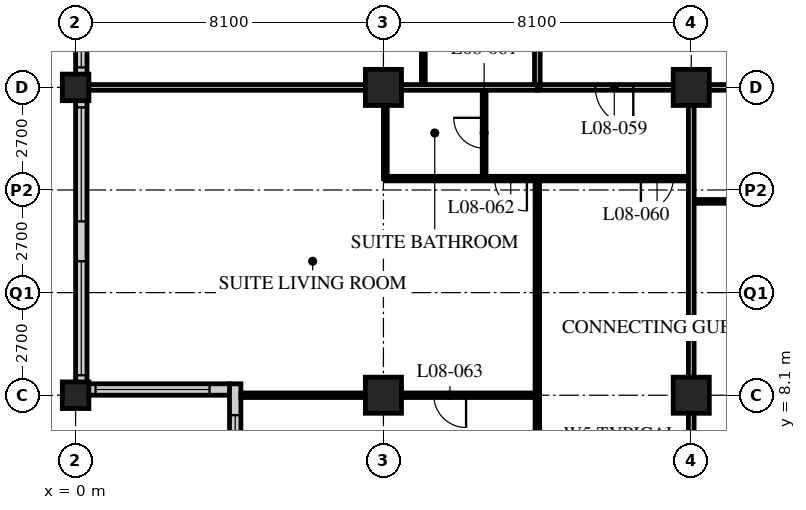
"""IFC4 building model, lengths in metres.
Left out: names, types, materials, properties, quantities, classifications, styles, units other than length and angle.
Written with IfcOpenShell. Run it as: python <this file> out.ifc"""

import sys

from ifc_helpers import new_model, si_unit, direction, frame, frame_2d, origin, origin_2d, place, context, subcontext, project, spatial, rectangle, hollow_rectangle, extrude, element, fill, save


model = new_model("IFC4")
c1 = context("Model", 3, precision=1e-05, world=origin(), true_north=direction((0.0, 1.0)))
c2 = subcontext(c1, "Body", "Model", "MODEL_VIEW")
j1 = project(units=[si_unit("LENGTHUNIT", "METRE"), si_unit("PLANEANGLEUNIT", "RADIAN")], contexts=[c1])
p1 = place(None, origin())
s1 = spatial("IfcSite", under=j1, at=p1, CompositionType="ELEMENT")
p2 = place(p1, origin())
s2 = spatial("IfcBuilding", under=s1, at=p2, CompositionType="ELEMENT")
p3 = place(p2, frame((0.0, 0.0, 39.8)))
s3 = spatial("IfcBuildingStorey", under=s2, at=p3, CompositionType="ELEMENT", Elevation=39.8)
for number, where, z_axis, x_axis in (
    (1, (0.0, 8.1, 0.0), (0.0, 0.0, 1.0), (1.0, 0.0, 0.0)),
    (2, (0.0, 16.2, 0.0), (0.0, 0.0, 1.0), (1.0, 0.0, 0.0)),
):
    element("IfcColumn", number, at=place(p3, frame(where, z_axis=z_axis, x_axis=x_axis)), inside=s3, PredefinedType="COLUMN", context=c2, shape_type="SweptSolid", body=[
        extrude(hollow_rectangle(XDim=0.7, YDim=0.7, WallThickness=0.06, at=origin_2d()), origin(), (0.0, 0.0, 1.0), 3.4),
    ])
for number, where, z_axis, x_axis in (
    (3, (8.1, 8.1, 0.0), (0.0, 0.0, 1.0), (1.0, 0.0, 0.0)),
    (4, (8.1, 16.2, 0.0), (0.0, 0.0, 1.0), (1.0, 0.0, 0.0)),
    (5, (16.2, 8.1, 0.0), (0.0, 0.0, 1.0), (1.0, 0.0, 0.0)),
    (6, (16.2, 16.2, 0.0), (0.0, 0.0, 1.0), (1.0, 0.0, 0.0)),
):
    element("IfcColumn", number, at=place(p3, frame(where, z_axis=z_axis, x_axis=x_axis)), inside=s3, PredefinedType="COLUMN", context=c2, shape_type="SweptSolid", body=[
        extrude(hollow_rectangle(XDim=0.95, YDim=0.95, WallThickness=0.095, at=origin_2d()), origin(), (0.0, 0.0, 1.0), 3.4),
    ])
p4 = place(p3, frame((0.15, 40.2, 0.0), z_axis=(0.0, 0.0, 1.0), x_axis=(0.0, -1.0, 0.0)))
e7 = element("IfcWall", 7, at=p4, inside=s3, PredefinedType="SOLIDWALL", context=c2, shape_type="SweptSolid", body=[
    extrude(rectangle(XDim=32.1, YDim=0.3, at=frame_2d((16.05, 0.0))), origin(), (0.0, 0.0, 1.0), 3.19),
])
p5 = place(p4, frame((0.225, 0.0, 0.9)))
e8 = element("IfcOpeningElement", 8, at=p5, cuts=e7, PredefinedType="OPENING", context=c2, shape_type="SweptSolid", body=[
    extrude(rectangle(XDim=3.0, YDim=2.0, at=frame_2d((1.5, 1.0))), frame((0.0, 0.16, 0.0), z_axis=(0.0, -1.0, 0.0), x_axis=(1.0, 0.0, 0.0)), (0.0, 0.0, 1.0), 0.32),
])
p6 = place(p4, frame((4.275, 0.0, 0.9)))
e9 = element("IfcOpeningElement", 9, at=p6, cuts=e7, PredefinedType="OPENING", context=c2, shape_type="SweptSolid", body=[
    extrude(rectangle(XDim=3.0, YDim=2.0, at=frame_2d((1.5, 1.0))), frame((0.0, 0.16, 0.0), z_axis=(0.0, -1.0, 0.0), x_axis=(1.0, 0.0, 0.0)), (0.0, 0.0, 1.0), 0.32),
])
p7 = place(p4, frame((8.325, 0.0, 0.9)))
e10 = element("IfcOpeningElement", 10, at=p7, cuts=e7, PredefinedType="OPENING", context=c2, shape_type="SweptSolid", body=[
    extrude(rectangle(XDim=3.0, YDim=2.0, at=frame_2d((1.5, 1.0))), frame((0.0, 0.16, 0.0), z_axis=(0.0, -1.0, 0.0), x_axis=(1.0, 0.0, 0.0)), (0.0, 0.0, 1.0), 0.32),
])
p8 = place(p4, frame((12.375, 0.0, 0.9)))
e11 = element("IfcOpeningElement", 11, at=p8, cuts=e7, PredefinedType="OPENING", context=c2, shape_type="SweptSolid", body=[
    extrude(rectangle(XDim=3.0, YDim=2.0, at=frame_2d((1.5, 1.0))), frame((0.0, 0.16, 0.0), z_axis=(0.0, -1.0, 0.0), x_axis=(1.0, 0.0, 0.0)), (0.0, 0.0, 1.0), 0.32),
])
p9 = place(p4, frame((16.425, 0.0, 0.9)))
e12 = element("IfcOpeningElement", 12, at=p9, cuts=e7, PredefinedType="OPENING", context=c2, shape_type="SweptSolid", body=[
    extrude(rectangle(XDim=3.0, YDim=2.0, at=frame_2d((1.5, 1.0))), frame((0.0, 0.16, 0.0), z_axis=(0.0, -1.0, 0.0), x_axis=(1.0, 0.0, 0.0)), (0.0, 0.0, 1.0), 0.32),
])
p10 = place(p4, frame((20.475, 0.0, 0.9)))
e13 = element("IfcOpeningElement", 13, at=p10, cuts=e7, PredefinedType="OPENING", context=c2, shape_type="SweptSolid", body=[
    extrude(rectangle(XDim=3.0, YDim=2.0, at=frame_2d((1.5, 1.0))), frame((0.0, 0.16, 0.0), z_axis=(0.0, -1.0, 0.0), x_axis=(1.0, 0.0, 0.0)), (0.0, 0.0, 1.0), 0.32),
])
p11 = place(p4, frame((24.525, 0.0, 0.9)))
e14 = element("IfcOpeningElement", 14, at=p11, cuts=e7, PredefinedType="OPENING", context=c2, shape_type="SweptSolid", body=[
    extrude(rectangle(XDim=3.0, YDim=2.0, at=frame_2d((1.5, 1.0))), frame((0.0, 0.16, 0.0), z_axis=(0.0, -1.0, 0.0), x_axis=(1.0, 0.0, 0.0)), (0.0, 0.0, 1.0), 0.32),
])
p12 = place(p4, frame((28.575, 0.0, 0.9)))
e15 = element("IfcOpeningElement", 15, at=p12, cuts=e7, PredefinedType="OPENING", context=c2, shape_type="SweptSolid", body=[
    extrude(rectangle(XDim=3.0, YDim=2.0, at=frame_2d((1.5, 1.0))), frame((0.0, 0.16, 0.0), z_axis=(0.0, -1.0, 0.0), x_axis=(1.0, 0.0, 0.0)), (0.0, 0.0, 1.0), 0.32),
])
p13 = place(p3, frame((0.3, 8.25, 0.0), z_axis=(0.0, 0.0, 1.0), x_axis=(1.0, 0.0, 0.0)))
e16 = element("IfcWall", 16, at=p13, inside=s3, PredefinedType="SOLIDWALL", context=c2, shape_type="SweptSolid", body=[
    extrude(rectangle(XDim=3.75, YDim=0.3, at=frame_2d((1.875, 0.0))), origin(), (0.0, 0.0, 1.0), 3.19),
])
p14 = place(p13, frame((0.225, 0.0, 0.9)))
e17 = element("IfcOpeningElement", 17, at=p14, cuts=e16, PredefinedType="OPENING", context=c2, shape_type="SweptSolid", body=[
    extrude(rectangle(XDim=3.0, YDim=1.5, at=frame_2d((1.5, 0.75))), frame((0.0, 0.16, 0.0), z_axis=(0.0, -1.0, 0.0), x_axis=(1.0, 0.0, 0.0)), (0.0, 0.0, 1.0), 0.32),
])
p15 = place(p3, frame((4.2, 8.4, 0.0), z_axis=(0.0, 0.0, 1.0), x_axis=(0.0, -1.0, 0.0)))
e18 = element("IfcWall", 18, at=p15, inside=s3, PredefinedType="SOLIDWALL", context=c2, shape_type="SweptSolid", body=[
    extrude(rectangle(XDim=4.35, YDim=0.3, at=frame_2d((2.175, 0.0))), origin(), (0.0, 0.0, 1.0), 3.19),
])
p16 = place(p15, frame((0.825, 0.0, 0.9)))
e19 = element("IfcOpeningElement", 19, at=p16, cuts=e18, PredefinedType="OPENING", context=c2, shape_type="SweptSolid", body=[
    extrude(rectangle(XDim=3.0, YDim=1.5, at=frame_2d((1.5, 0.75))), frame((0.0, 0.16, 0.0), z_axis=(0.0, -1.0, 0.0), x_axis=(1.0, 0.0, 0.0)), (0.0, 0.0, 1.0), 0.32),
])
p17 = place(p3, frame((12.15, 16.2, 0.0), z_axis=(0.0, 0.0, 1.0), x_axis=(1.0, 0.0, 0.0)))
e20 = element("IfcWall", 20, at=p17, inside=s3, PredefinedType="PARTITIONING", context=c2, shape_type="SweptSolid", body=[
    extrude(rectangle(XDim=32.4, YDim=0.15, at=frame_2d((16.2, 0.0))), origin(), (0.0, 0.0, 1.0), 2.578),
])
p18 = place(p17, frame((6.5, 0.0, 0.0)))
e21 = element("IfcOpeningElement", 21, at=p18, cuts=e20, PredefinedType="OPENING", context=c2, shape_type="SweptSolid", body=[
    extrude(rectangle(XDim=1.0, YDim=2.1, at=frame_2d((0.5, 1.05))), frame((0.0, 0.085, 0.0), z_axis=(0.0, -1.0, 0.0), x_axis=(1.0, 0.0, 0.0)), (0.0, 0.0, 1.0), 0.17),
])
p19 = place(p17, frame((8.4, 0.0, 0.0)))
e22 = element("IfcOpeningElement", 22, at=p19, cuts=e20, PredefinedType="OPENING", context=c2, shape_type="SweptSolid", body=[
    extrude(rectangle(XDim=1.0, YDim=2.1, at=frame_2d((0.5, 1.05))), frame((0.0, 0.085, 0.0), z_axis=(0.0, -1.0, 0.0), x_axis=(1.0, 0.0, 0.0)), (0.0, 0.0, 1.0), 0.17),
])
p20 = place(p17, frame((14.6, 0.0, 0.0)))
e23 = element("IfcOpeningElement", 23, at=p20, cuts=e20, PredefinedType="OPENING", context=c2, shape_type="SweptSolid", body=[
    extrude(rectangle(XDim=1.0, YDim=2.1, at=frame_2d((0.5, 1.05))), frame((0.0, 0.085, 0.0), z_axis=(0.0, -1.0, 0.0), x_axis=(1.0, 0.0, 0.0)), (0.0, 0.0, 1.0), 0.17),
])
p21 = place(p17, frame((16.5, 0.0, 0.0)))
e24 = element("IfcOpeningElement", 24, at=p21, cuts=e20, PredefinedType="OPENING", context=c2, shape_type="SweptSolid", body=[
    extrude(rectangle(XDim=1.0, YDim=2.1, at=frame_2d((0.5, 1.05))), frame((0.0, 0.085, 0.0), z_axis=(0.0, -1.0, 0.0), x_axis=(1.0, 0.0, 0.0)), (0.0, 0.0, 1.0), 0.17),
])
p22 = place(p17, frame((23.0, 0.0, 0.0)))
e25 = element("IfcOpeningElement", 25, at=p22, cuts=e20, PredefinedType="OPENING", context=c2, shape_type="SweptSolid", body=[
    extrude(rectangle(XDim=1.0, YDim=2.1, at=frame_2d((0.5, 1.05))), frame((0.0, 0.085, 0.0), z_axis=(0.0, -1.0, 0.0), x_axis=(1.0, 0.0, 0.0)), (0.0, 0.0, 1.0), 0.17),
])
p23 = place(p17, frame((24.6, 0.0, 0.0)))
e26 = element("IfcOpeningElement", 26, at=p23, cuts=e20, PredefinedType="OPENING", context=c2, shape_type="SweptSolid", body=[
    extrude(rectangle(XDim=1.0, YDim=2.1, at=frame_2d((0.5, 1.05))), frame((0.0, 0.085, 0.0), z_axis=(0.0, -1.0, 0.0), x_axis=(1.0, 0.0, 0.0)), (0.0, 0.0, 1.0), 0.17),
])
p24 = place(p17, frame((1.525, 0.0, 0.0)))
e27 = element("IfcOpeningElement", 27, at=p24, cuts=e20, PredefinedType="OPENING", context=c2, shape_type="SweptSolid", body=[
    extrude(rectangle(XDim=1.0, YDim=2.1, at=frame_2d((0.5, 1.05))), frame((0.0, 0.085, 0.0), z_axis=(0.0, -1.0, 0.0), x_axis=(1.0, 0.0, 0.0)), (0.0, 0.0, 1.0), 0.17),
])
p25 = place(p17, frame((29.875, 0.0, 0.0)))
e28 = element("IfcOpeningElement", 28, at=p25, cuts=e20, PredefinedType="OPENING", context=c2, shape_type="SweptSolid", body=[
    extrude(rectangle(XDim=1.0, YDim=2.1, at=frame_2d((0.5, 1.05))), frame((0.0, 0.085, 0.0), z_axis=(0.0, -1.0, 0.0), x_axis=(1.0, 0.0, 0.0)), (0.0, 0.0, 1.0), 0.17),
])
p26 = place(p3, frame((12.15, 16.2, 0.0), z_axis=(0.0, 0.0, 1.0), x_axis=(0.0, 1.0, 0.0)))
e29 = element("IfcWall", 29, at=p26, inside=s3, PredefinedType="PARTITIONING", context=c2, shape_type="SweptSolid", body=[
    extrude(rectangle(XDim=26.1, YDim=0.15, at=frame_2d((13.05, 0.0))), origin(), (0.0, 0.0, 1.0), 3.19),
])
p27 = place(p26, frame((2.75, 0.0, 0.0)))
e30 = element("IfcOpeningElement", 30, at=p27, cuts=e29, PredefinedType="OPENING", context=c2, shape_type="SweptSolid", body=[
    extrude(rectangle(XDim=1.0, YDim=2.1, at=frame_2d((0.5, 1.05))), frame((0.0, 0.085, 0.0), z_axis=(0.0, -1.0, 0.0), x_axis=(1.0, 0.0, 0.0)), (0.0, 0.0, 1.0), 0.17),
])
p28 = place(p26, frame((4.35, 0.0, 0.0)))
e31 = element("IfcOpeningElement", 31, at=p28, cuts=e29, PredefinedType="OPENING", context=c2, shape_type="SweptSolid", body=[
    extrude(rectangle(XDim=1.0, YDim=2.1, at=frame_2d((0.5, 1.05))), frame((0.0, 0.085, 0.0), z_axis=(0.0, -1.0, 0.0), x_axis=(1.0, 0.0, 0.0)), (0.0, 0.0, 1.0), 0.17),
])
p29 = place(p26, frame((10.55, 0.0, 0.0)))
e32 = element("IfcOpeningElement", 32, at=p29, cuts=e29, PredefinedType="OPENING", context=c2, shape_type="SweptSolid", body=[
    extrude(rectangle(XDim=1.0, YDim=2.1, at=frame_2d((0.5, 1.05))), frame((0.0, 0.085, 0.0), z_axis=(0.0, -1.0, 0.0), x_axis=(1.0, 0.0, 0.0)), (0.0, 0.0, 1.0), 0.17),
])
p30 = place(p26, frame((12.45, 0.0, 0.0)))
e33 = element("IfcOpeningElement", 33, at=p30, cuts=e29, PredefinedType="OPENING", context=c2, shape_type="SweptSolid", body=[
    extrude(rectangle(XDim=1.0, YDim=2.1, at=frame_2d((0.5, 1.05))), frame((0.0, 0.085, 0.0), z_axis=(0.0, -1.0, 0.0), x_axis=(1.0, 0.0, 0.0)), (0.0, 0.0, 1.0), 0.17),
])
p31 = place(p26, frame((18.65, 0.0, 0.0)))
e34 = element("IfcOpeningElement", 34, at=p31, cuts=e29, PredefinedType="OPENING", context=c2, shape_type="SweptSolid", body=[
    extrude(rectangle(XDim=1.0, YDim=2.1, at=frame_2d((0.5, 1.05))), frame((0.0, 0.085, 0.0), z_axis=(0.0, -1.0, 0.0), x_axis=(1.0, 0.0, 0.0)), (0.0, 0.0, 1.0), 0.17),
])
p32 = place(p26, frame((22.65, 0.0, 0.0)))
e35 = element("IfcOpeningElement", 35, at=p32, cuts=e29, PredefinedType="OPENING", context=c2, shape_type="SweptSolid", body=[
    extrude(rectangle(XDim=1.0, YDim=2.1, at=frame_2d((0.5, 1.05))), frame((0.0, 0.085, 0.0), z_axis=(0.0, -1.0, 0.0), x_axis=(1.0, 0.0, 0.0)), (0.0, 0.0, 1.0), 0.17),
])
p33 = place(p3, frame((16.2, 13.2, 0.0), z_axis=(0.0, 0.0, 1.0), x_axis=(1.0, 0.0, 0.0)))
e36 = element("IfcWall", 36, at=p33, inside=s3, PredefinedType="PARTITIONING", context=c2, shape_type="SweptSolid", body=[
    extrude(rectangle(XDim=2.3, YDim=0.1, at=frame_2d((1.15, 0.0))), origin(), (0.0, 0.0, 1.0), 3.19),
])
p34 = place(p3, frame((9.15, 16.2, 0.0), z_axis=(0.0, 0.0, 1.0), x_axis=(0.0, 1.0, 0.0)))
e37 = element("IfcWall", 37, at=p34, inside=s3, PredefinedType="PARTITIONING", context=c2, shape_type="SweptSolid", body=[
    extrude(rectangle(XDim=2.6, YDim=0.1, at=frame_2d((1.3, 0.0))), origin(), (0.0, 0.0, 1.0), 3.19),
])
p35 = place(p3, frame((10.75, 16.2, 0.0), z_axis=(0.0, 0.0, 1.0), x_axis=(0.0, -1.0, 0.0)))
e38 = element("IfcWall", 38, at=p35, inside=s3, PredefinedType="PARTITIONING", context=c2, shape_type="SweptSolid", body=[
    extrude(rectangle(XDim=2.4, YDim=0.1, at=frame_2d((1.2, 0.0))), origin(), (0.0, 0.0, 1.0), 3.19),
])
p36 = place(p35, frame((0.8, 0.0, 0.0)))
e39 = element("IfcOpeningElement", 39, at=p36, cuts=e38, PredefinedType="OPENING", context=c2, shape_type="SweptSolid", body=[
    extrude(rectangle(XDim=0.8, YDim=2.1, at=frame_2d((0.4, 1.05))), frame((0.0, 0.06, 0.0), z_axis=(0.0, -1.0, 0.0), x_axis=(1.0, 0.0, 0.0)), (0.0, 0.0, 1.0), 0.12),
])
p37 = place(p3, frame((8.15, 16.2, 0.0), z_axis=(0.0, 0.0, 1.0), x_axis=(0.0, -1.0, 0.0)))
e40 = element("IfcWall", 40, at=p37, inside=s3, PredefinedType="PARTITIONING", context=c2, shape_type="SweptSolid", body=[
    extrude(rectangle(XDim=2.4, YDim=0.1, at=frame_2d((1.2, 0.0))), origin(), (0.0, 0.0, 1.0), 2.578),
])
p38 = place(p3, frame((8.15, 13.8, 0.0), z_axis=(0.0, 0.0, 1.0), x_axis=(1.0, 0.0, 0.0)))
e41 = element("IfcWall", 41, at=p38, inside=s3, PredefinedType="PARTITIONING", context=c2, shape_type="SweptSolid", body=[
    extrude(rectangle(XDim=8.05, YDim=0.12, at=frame_2d((4.025, 0.0))), origin(), (0.0, 0.0, 1.0), 3.19),
])
p39 = place(p38, frame((6.725, 0.0, 0.0)))
e42 = element("IfcOpeningElement", 42, at=p39, cuts=e41, PredefinedType="OPENING", context=c2, shape_type="SweptSolid", body=[
    extrude(rectangle(XDim=0.85, YDim=2.1, at=frame_2d((0.425, 1.05))), frame((0.0, 0.07, 0.0), z_axis=(0.0, -1.0, 0.0), x_axis=(1.0, 0.0, 0.0)), (0.0, 0.0, 1.0), 0.14),
])
p40 = place(p38, frame((2.875, 0.0, 0.0)))
e43 = element("IfcOpeningElement", 43, at=p40, cuts=e41, PredefinedType="OPENING", context=c2, shape_type="SweptSolid", body=[
    extrude(rectangle(XDim=0.85, YDim=2.1, at=frame_2d((0.425, 1.05))), frame((0.0, 0.07, 0.0), z_axis=(0.0, -1.0, 0.0), x_axis=(1.0, 0.0, 0.0)), (0.0, 0.0, 1.0), 0.14),
])
p41 = place(p3, frame((12.15, 13.8, 0.0), z_axis=(0.0, 0.0, 1.0), x_axis=(0.0, -1.0, 0.0)))
e44 = element("IfcWall", 44, at=p41, inside=s3, PredefinedType="PARTITIONING", context=c2, shape_type="SweptSolid", body=[
    extrude(rectangle(XDim=13.5, YDim=0.12, at=frame_2d((6.75, 0.0))), origin(), (0.0, 0.0, 1.0), 3.19),
])
p42 = place(p3, frame((12.15, 8.1, 0.0), z_axis=(0.0, 0.0, 1.0), x_axis=(-1.0, 0.0, 0.0)))
e45 = element("IfcWall", 45, at=p42, inside=s3, PredefinedType="PARTITIONING", context=c2, shape_type="SweptSolid", body=[
    extrude(rectangle(XDim=7.8, YDim=0.12, at=frame_2d((3.9, 0.0))), origin(), (0.0, 0.0, 1.0), 2.578),
])
p43 = place(p42, frame((1.875, 0.0, 0.0)))
e46 = element("IfcOpeningElement", 46, at=p43, cuts=e45, PredefinedType="OPENING", context=c2, shape_type="SweptSolid", body=[
    extrude(rectangle(XDim=0.85, YDim=2.1, at=frame_2d((0.425, 1.05))), frame((0.0, 0.07, 0.0), z_axis=(0.0, -1.0, 0.0), x_axis=(1.0, 0.0, 0.0)), (0.0, 0.0, 1.0), 0.14),
])
p44 = place(p3, frame((0.3, 16.2, 0.0), z_axis=(0.0, 0.0, 1.0), x_axis=(1.0, 0.0, 0.0)))
e47 = element("IfcWall", 47, at=p44, inside=s3, PredefinedType="PARTITIONING", context=c2, shape_type="SweptSolid", body=[
    extrude(rectangle(XDim=11.85, YDim=0.15, at=frame_2d((5.925, 0.0))), origin(), (0.0, 0.0, 1.0), 2.578),
])
p45 = place(p3, frame((16.2, 16.2, 0.0), z_axis=(0.0, 0.0, 1.0), x_axis=(0.0, -1.0, 0.0)))
e48 = element("IfcWall", 48, at=p45, inside=s3, PredefinedType="PARTITIONING", context=c2, shape_type="SweptSolid", body=[
    extrude(rectangle(XDim=15.9, YDim=0.15, at=frame_2d((7.95, 0.0))), origin(), (0.0, 0.0, 1.0), 2.578),
])
p46 = place(p10, origin())
e49 = element("IfcWindow", 49, at=p46, inside=s3, PartitioningType="SINGLE_PANEL", PredefinedType="WINDOW", context=c2, shape_type="SweptSolid", body=[
    extrude(rectangle(XDim=3.0, YDim=2.0, at=frame_2d((1.5, 1.0))), frame((0.0, 0.03, 0.0), z_axis=(0.0, -1.0, 0.0), x_axis=(1.0, 0.0, 0.0)), (0.0, 0.0, 1.0), 0.06),
])
fill(e13, e49)
p47 = place(p11, origin())
e50 = element("IfcWindow", 50, at=p47, inside=s3, PartitioningType="SINGLE_PANEL", PredefinedType="WINDOW", context=c2, shape_type="SweptSolid", body=[
    extrude(rectangle(XDim=3.0, YDim=2.0, at=frame_2d((1.5, 1.0))), frame((0.0, 0.03, 0.0), z_axis=(0.0, -1.0, 0.0), x_axis=(1.0, 0.0, 0.0)), (0.0, 0.0, 1.0), 0.06),
])
fill(e14, e50)
p48 = place(p12, origin())
e51 = element("IfcWindow", 51, at=p48, inside=s3, PartitioningType="SINGLE_PANEL", PredefinedType="WINDOW", context=c2, shape_type="SweptSolid", body=[
    extrude(rectangle(XDim=3.0, YDim=2.0, at=frame_2d((1.5, 1.0))), frame((0.0, 0.03, 0.0), z_axis=(0.0, -1.0, 0.0), x_axis=(1.0, 0.0, 0.0)), (0.0, 0.0, 1.0), 0.06),
])
fill(e15, e51)
p49 = place(p14, origin())
e52 = element("IfcWindow", 52, at=p49, inside=s3, PartitioningType="SINGLE_PANEL", PredefinedType="WINDOW", context=c2, shape_type="SweptSolid", body=[
    extrude(rectangle(XDim=3.0, YDim=1.5, at=frame_2d((1.5, 0.75))), frame((0.0, 0.03, 0.0), z_axis=(0.0, -1.0, 0.0), x_axis=(1.0, 0.0, 0.0)), (0.0, 0.0, 1.0), 0.06),
])
fill(e17, e52)
p50 = place(p16, origin())
e53 = element("IfcWindow", 53, at=p50, inside=s3, PartitioningType="SINGLE_PANEL", PredefinedType="WINDOW", context=c2, shape_type="SweptSolid", body=[
    extrude(rectangle(XDim=3.0, YDim=1.5, at=frame_2d((1.5, 0.75))), frame((0.0, 0.03, 0.0), z_axis=(0.0, -1.0, 0.0), x_axis=(1.0, 0.0, 0.0)), (0.0, 0.0, 1.0), 0.06),
])
fill(e19, e53)
p51 = place(p24, origin())
e54 = element("IfcDoor", 54, at=p51, inside=s3, OperationType="SINGLE_SWING_LEFT", PredefinedType="DOOR", context=c2, shape_type="SweptSolid", body=[
    extrude(rectangle(XDim=1.0, YDim=2.1, at=frame_2d((0.5, 1.05))), frame((0.0, 0.025, 0.0), z_axis=(0.0, -1.0, 0.0), x_axis=(1.0, 0.0, 0.0)), (0.0, 0.0, 1.0), 0.05),
])
fill(e27, e54)
p52 = place(p39, origin())
e55 = element("IfcDoor", 55, at=p52, inside=s3, OperationType="SINGLE_SWING_RIGHT", PredefinedType="DOOR", context=c2, shape_type="SweptSolid", body=[
    extrude(rectangle(XDim=0.85, YDim=2.1, at=frame_2d((0.425, 1.05))), frame((0.0, 0.025, 0.0), z_axis=(0.0, -1.0, 0.0), x_axis=(1.0, 0.0, 0.0)), (0.0, 0.0, 1.0), 0.05),
])
fill(e42, e55)
p53 = place(p36, origin())
e56 = element("IfcDoor", 56, at=p53, inside=s3, OperationType="SINGLE_SWING_RIGHT", PredefinedType="DOOR", context=c2, shape_type="SweptSolid", body=[
    extrude(rectangle(XDim=0.8, YDim=2.1, at=frame_2d((0.4, 1.05))), frame((0.0, 0.025, 0.0), z_axis=(0.0, -1.0, 0.0), x_axis=(1.0, 0.0, 0.0)), (0.0, 0.0, 1.0), 0.05),
])
fill(e39, e56)
p54 = place(p40, origin())
e57 = element("IfcDoor", 57, at=p54, inside=s3, OperationType="SINGLE_SWING_LEFT", PredefinedType="DOOR", context=c2, shape_type="SweptSolid", body=[
    extrude(rectangle(XDim=0.85, YDim=2.1, at=frame_2d((0.425, 1.05))), frame((0.0, 0.025, 0.0), z_axis=(0.0, -1.0, 0.0), x_axis=(1.0, 0.0, 0.0)), (0.0, 0.0, 1.0), 0.05),
])
fill(e43, e57)
p55 = place(p43, origin())
e58 = element("IfcDoor", 58, at=p55, inside=s3, OperationType="SINGLE_SWING_LEFT", PredefinedType="DOOR", context=c2, shape_type="SweptSolid", body=[
    extrude(rectangle(XDim=0.85, YDim=2.1, at=frame_2d((0.425, 1.05))), frame((0.0, 0.025, 0.0), z_axis=(0.0, -1.0, 0.0), x_axis=(1.0, 0.0, 0.0)), (0.0, 0.0, 1.0), 0.05),
])
fill(e46, e58)
save(model, sys.argv[1])
